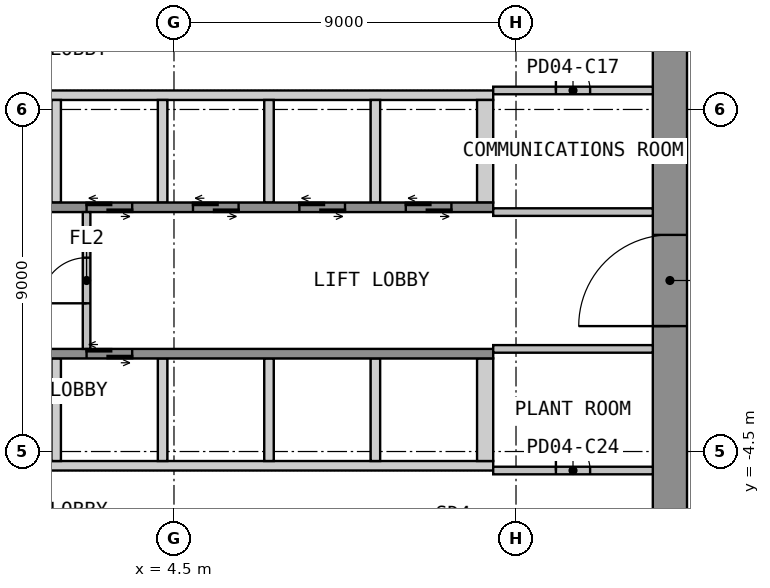
"""IFC4 building model, lengths in metres.
Left out: names, types, materials, properties, quantities, classifications, styles, units other than length and angle.
Written with IfcOpenShell. Run it as: python <this file> out.ifc"""

import sys

from ifc_helpers import new_model, si_unit, direction, frame, frame_2d, origin, place, context, subcontext, project, spatial, polyline, rectangle, outline, extrude, element, fill, save


model = new_model("IFC4")
c1 = context("Model", 3, precision=1e-05, world=origin(), true_north=direction((0.0, 1.0)))
c2 = subcontext(c1, "Body", "Model", "MODEL_VIEW")
j1 = project(units=[si_unit("LENGTHUNIT", "METRE"), si_unit("PLANEANGLEUNIT", "RADIAN")], contexts=[c1])
p1 = place(None, origin())
s1 = spatial("IfcSite", under=j1, at=p1, CompositionType="ELEMENT")
p2 = place(p1, origin())
s2 = spatial("IfcBuilding", under=s1, at=p2, CompositionType="ELEMENT")
p3 = place(p2, frame((0.0, 0.0, 20.4)))
s3 = spatial("IfcBuildingStorey", under=s2, at=p3, CompositionType="ELEMENT", Elevation=20.4)
p4 = place(p3, frame((17.55, -12.6, 0.0), z_axis=(0.0, 0.0, 1.0), x_axis=(0.0, 1.0, 0.0)))
e1 = element("IfcWall", 1, at=p4, inside=s3, PredefinedType="SHEAR", context=c2, shape_type="SweptSolid", body=[
    extrude(rectangle(XDim=25.2, YDim=0.9, at=frame_2d((12.6, 0.0))), origin(), (0.0, 0.0, 1.0), 4.4),
])
p5 = place(p4, frame((11.4, 0.0, 0.0)))
e2 = element("IfcOpeningElement", 2, at=p5, cuts=e1, PredefinedType="OPENING", context=c2, shape_type="SweptSolid", body=[
    extrude(rectangle(XDim=2.4, YDim=2.1, at=frame_2d((1.2, 1.05))), frame((0.0, 0.46, 0.0), z_axis=(0.0, -1.0, 0.0), x_axis=(1.0, 0.0, 0.0)), (0.0, 0.0, 1.0), 0.92),
])
p6 = place(p3, origin())
e3 = element("IfcWall", 3, at=p6, inside=s3, PredefinedType="SHEAR", context=c2, shape_type="SweptSolid", body=[
    extrude(outline(polyline([(-12.9, 4.75), (12.9, 4.75), (12.9, 5.0), (-12.9, 5.0), (-12.9, 4.75)])), origin(), (0.0, 0.0, 1.0), 4.4),
])
p7 = place(p3, origin())
e4 = element("IfcWall", 4, at=p7, inside=s3, PredefinedType="SHEAR", context=c2, shape_type="SweptSolid", body=[
    extrude(outline(polyline([(1.275, 2.05), (1.525, 2.05), (1.525, 4.75), (1.275, 4.75), (1.275, 2.05)])), origin(), (0.0, 0.0, 1.0), 4.4),
])
p8 = place(p3, origin())
e5 = element("IfcWall", 5, at=p8, inside=s3, PredefinedType="SHEAR", context=c2, shape_type="SweptSolid", body=[
    extrude(outline(polyline([(4.075, 2.05), (4.325, 2.05), (4.325, 4.75), (4.075, 4.75), (4.075, 2.05)])), origin(), (0.0, 0.0, 1.0), 4.4),
])
p9 = place(p3, origin())
e6 = element("IfcWall", 6, at=p9, inside=s3, PredefinedType="SHEAR", context=c2, shape_type="SweptSolid", body=[
    extrude(outline(polyline([(6.875, 2.05), (7.125, 2.05), (7.125, 4.75), (6.875, 4.75), (6.875, 2.05)])), origin(), (0.0, 0.0, 1.0), 4.4),
])
p10 = place(p3, origin())
e7 = element("IfcWall", 7, at=p10, inside=s3, PredefinedType="SHEAR", context=c2, shape_type="SweptSolid", body=[
    extrude(outline(polyline([(9.675, 2.05), (9.925, 2.05), (9.925, 4.75), (9.675, 4.75), (9.675, 2.05)])), origin(), (0.0, 0.0, 1.0), 4.4),
])
p11 = place(p3, origin())
e8 = element("IfcWall", 8, at=p11, inside=s3, PredefinedType="SHEAR", context=c2, shape_type="SweptSolid", body=[
    extrude(outline(polyline([(12.475, 2.05), (12.9, 2.05), (12.9, 4.75), (12.475, 4.75), (12.475, 2.05)])), origin(), (0.0, 0.0, 1.0), 4.4),
])
p12 = place(p3, frame((-12.9, 1.925, 0.0), z_axis=(0.0, 0.0, 1.0), x_axis=(1.0, 0.0, 0.0)))
e9 = element("IfcWall", 9, at=p12, inside=s3, PredefinedType="SHEAR", context=c2, shape_type="SweptSolid", body=[
    extrude(rectangle(XDim=25.8, YDim=0.25, at=frame_2d((12.9, 0.0))), origin(), (0.0, 0.0, 1.0), 4.4),
])
p13 = place(p12, frame((9.5, 0.0, 0.0)))
e10 = element("IfcOpeningElement", 10, at=p13, cuts=e9, PredefinedType="OPENING", context=c2, shape_type="SweptSolid", body=[
    extrude(rectangle(XDim=1.2, YDim=2.1, at=frame_2d((0.6, 1.05))), frame((0.0, 0.135, 0.0), z_axis=(0.0, -1.0, 0.0), x_axis=(1.0, 0.0, 0.0)), (0.0, 0.0, 1.0), 0.27),
])
p14 = place(p12, frame((12.3, 0.0, 0.0)))
e11 = element("IfcOpeningElement", 11, at=p14, cuts=e9, PredefinedType="OPENING", context=c2, shape_type="SweptSolid", body=[
    extrude(rectangle(XDim=1.2, YDim=2.1, at=frame_2d((0.6, 1.05))), frame((0.0, 0.135, 0.0), z_axis=(0.0, -1.0, 0.0), x_axis=(1.0, 0.0, 0.0)), (0.0, 0.0, 1.0), 0.27),
])
p15 = place(p12, frame((15.1, 0.0, 0.0)))
e12 = element("IfcOpeningElement", 12, at=p15, cuts=e9, PredefinedType="OPENING", context=c2, shape_type="SweptSolid", body=[
    extrude(rectangle(XDim=1.2, YDim=2.1, at=frame_2d((0.6, 1.05))), frame((0.0, 0.135, 0.0), z_axis=(0.0, -1.0, 0.0), x_axis=(1.0, 0.0, 0.0)), (0.0, 0.0, 1.0), 0.27),
])
p16 = place(p12, frame((17.9, 0.0, 0.0)))
e13 = element("IfcOpeningElement", 13, at=p16, cuts=e9, PredefinedType="OPENING", context=c2, shape_type="SweptSolid", body=[
    extrude(rectangle(XDim=1.2, YDim=2.1, at=frame_2d((0.6, 1.05))), frame((0.0, 0.135, 0.0), z_axis=(0.0, -1.0, 0.0), x_axis=(1.0, 0.0, 0.0)), (0.0, 0.0, 1.0), 0.27),
])
p17 = place(p12, frame((20.7, 0.0, 0.0)))
e14 = element("IfcOpeningElement", 14, at=p17, cuts=e9, PredefinedType="OPENING", context=c2, shape_type="SweptSolid", body=[
    extrude(rectangle(XDim=1.2, YDim=2.1, at=frame_2d((0.6, 1.05))), frame((0.0, 0.135, 0.0), z_axis=(0.0, -1.0, 0.0), x_axis=(1.0, 0.0, 0.0)), (0.0, 0.0, 1.0), 0.27),
])
p18 = place(p12, frame((23.5, 0.0, 0.0)))
e15 = element("IfcOpeningElement", 15, at=p18, cuts=e9, PredefinedType="OPENING", context=c2, shape_type="SweptSolid", body=[
    extrude(rectangle(XDim=1.2, YDim=2.1, at=frame_2d((0.6, 1.05))), frame((0.0, 0.135, 0.0), z_axis=(0.0, -1.0, 0.0), x_axis=(1.0, 0.0, 0.0)), (0.0, 0.0, 1.0), 0.27),
])
p19 = place(p3, origin())
e16 = element("IfcWall", 16, at=p19, inside=s3, PredefinedType="SHEAR", context=c2, shape_type="SweptSolid", body=[
    extrude(outline(polyline([(-12.9, -5.0), (12.9, -5.0), (12.9, -4.75), (-12.9, -4.75), (-12.9, -5.0)])), origin(), (0.0, 0.0, 1.0), 4.4),
])
p20 = place(p3, origin())
e17 = element("IfcWall", 17, at=p20, inside=s3, PredefinedType="SHEAR", context=c2, shape_type="SweptSolid", body=[
    extrude(outline(polyline([(1.275, -4.75), (1.525, -4.75), (1.525, -2.05), (1.275, -2.05), (1.275, -4.75)])), origin(), (0.0, 0.0, 1.0), 4.4),
])
p21 = place(p3, origin())
e18 = element("IfcWall", 18, at=p21, inside=s3, PredefinedType="SHEAR", context=c2, shape_type="SweptSolid", body=[
    extrude(outline(polyline([(4.075, -4.75), (4.325, -4.75), (4.325, -2.05), (4.075, -2.05), (4.075, -4.75)])), origin(), (0.0, 0.0, 1.0), 4.4),
])
p22 = place(p3, origin())
e19 = element("IfcWall", 19, at=p22, inside=s3, PredefinedType="SHEAR", context=c2, shape_type="SweptSolid", body=[
    extrude(outline(polyline([(6.875, -4.75), (7.125, -4.75), (7.125, -2.05), (6.875, -2.05), (6.875, -4.75)])), origin(), (0.0, 0.0, 1.0), 4.4),
])
p23 = place(p3, origin())
e20 = element("IfcWall", 20, at=p23, inside=s3, PredefinedType="SHEAR", context=c2, shape_type="SweptSolid", body=[
    extrude(outline(polyline([(9.675, -4.75), (9.925, -4.75), (9.925, -2.05), (9.675, -2.05), (9.675, -4.75)])), origin(), (0.0, 0.0, 1.0), 4.4),
])
p24 = place(p3, origin())
e21 = element("IfcWall", 21, at=p24, inside=s3, PredefinedType="SHEAR", context=c2, shape_type="SweptSolid", body=[
    extrude(outline(polyline([(12.475, -4.75), (12.9, -4.75), (12.9, -2.05), (12.475, -2.05), (12.475, -4.75)])), origin(), (0.0, 0.0, 1.0), 4.4),
])
p25 = place(p3, frame((-12.9, -1.925, 0.0), z_axis=(0.0, 0.0, 1.0), x_axis=(1.0, 0.0, 0.0)))
e22 = element("IfcWall", 22, at=p25, inside=s3, PredefinedType="SHEAR", context=c2, shape_type="SweptSolid", body=[
    extrude(rectangle(XDim=25.8, YDim=0.25, at=frame_2d((12.9, 0.0))), origin(), (0.0, 0.0, 1.0), 4.4),
])
p26 = place(p25, frame((1.1, 0.0, 0.0)))
e23 = element("IfcOpeningElement", 23, at=p26, cuts=e22, PredefinedType="OPENING", context=c2, shape_type="SweptSolid", body=[
    extrude(rectangle(XDim=1.2, YDim=2.1, at=frame_2d((0.6, 1.05))), frame((0.0, 0.135, 0.0), z_axis=(0.0, -1.0, 0.0), x_axis=(1.0, 0.0, 0.0)), (0.0, 0.0, 1.0), 0.27),
])
p27 = place(p25, frame((3.9, 0.0, 0.0)))
e24 = element("IfcOpeningElement", 24, at=p27, cuts=e22, PredefinedType="OPENING", context=c2, shape_type="SweptSolid", body=[
    extrude(rectangle(XDim=1.2, YDim=2.1, at=frame_2d((0.6, 1.05))), frame((0.0, 0.135, 0.0), z_axis=(0.0, -1.0, 0.0), x_axis=(1.0, 0.0, 0.0)), (0.0, 0.0, 1.0), 0.27),
])
p28 = place(p25, frame((6.7, 0.0, 0.0)))
e25 = element("IfcOpeningElement", 25, at=p28, cuts=e22, PredefinedType="OPENING", context=c2, shape_type="SweptSolid", body=[
    extrude(rectangle(XDim=1.2, YDim=2.1, at=frame_2d((0.6, 1.05))), frame((0.0, 0.135, 0.0), z_axis=(0.0, -1.0, 0.0), x_axis=(1.0, 0.0, 0.0)), (0.0, 0.0, 1.0), 0.27),
])
p29 = place(p25, frame((9.5, 0.0, 0.0)))
e26 = element("IfcOpeningElement", 26, at=p29, cuts=e22, PredefinedType="OPENING", context=c2, shape_type="SweptSolid", body=[
    extrude(rectangle(XDim=1.2, YDim=2.1, at=frame_2d((0.6, 1.05))), frame((0.0, 0.135, 0.0), z_axis=(0.0, -1.0, 0.0), x_axis=(1.0, 0.0, 0.0)), (0.0, 0.0, 1.0), 0.27),
])
p30 = place(p25, frame((12.3, 0.0, 0.0)))
e27 = element("IfcOpeningElement", 27, at=p30, cuts=e22, PredefinedType="OPENING", context=c2, shape_type="SweptSolid", body=[
    extrude(rectangle(XDim=1.2, YDim=2.1, at=frame_2d((0.6, 1.05))), frame((0.0, 0.135, 0.0), z_axis=(0.0, -1.0, 0.0), x_axis=(1.0, 0.0, 0.0)), (0.0, 0.0, 1.0), 0.27),
])
p31 = place(p25, frame((15.1, 0.0, 0.0)))
e28 = element("IfcOpeningElement", 28, at=p31, cuts=e22, PredefinedType="OPENING", context=c2, shape_type="SweptSolid", body=[
    extrude(rectangle(XDim=1.2, YDim=2.1, at=frame_2d((0.6, 1.05))), frame((0.0, 0.135, 0.0), z_axis=(0.0, -1.0, 0.0), x_axis=(1.0, 0.0, 0.0)), (0.0, 0.0, 1.0), 0.27),
])
p32 = place(p3, frame((2.2, -1.8, 0.0), z_axis=(0.0, 0.0, 1.0), x_axis=(0.0, 1.0, 0.0)))
e29 = element("IfcWall", 29, at=p32, inside=s3, PredefinedType="PARTITIONING", context=c2, shape_type="SweptSolid", body=[
    extrude(rectangle(XDim=3.6, YDim=0.2, at=frame_2d((1.8, 0.0))), origin(), (0.0, 0.0, 1.0), 4.4),
])
p33 = place(p32, frame((1.2, 0.0, 0.0)))
e30 = element("IfcOpeningElement", 30, at=p33, cuts=e29, PredefinedType="OPENING", context=c2, shape_type="SweptSolid", body=[
    extrude(rectangle(XDim=1.2, YDim=2.1, at=frame_2d((0.6, 1.05))), frame((0.0, 0.11, 0.0), z_axis=(0.0, -1.0, 0.0), x_axis=(1.0, 0.0, 0.0)), (0.0, 0.0, 1.0), 0.22),
])
p34 = place(p3, frame((12.9, 5.0, 0.0), z_axis=(0.0, 0.0, 1.0), x_axis=(1.0, 0.0, 0.0)))
e31 = element("IfcWall", 31, at=p34, inside=s3, PredefinedType="PARTITIONING", context=c2, shape_type="SweptSolid", body=[
    extrude(rectangle(XDim=4.2, YDim=0.2, at=frame_2d((2.1, 0.0))), origin(), (0.0, 0.0, 1.0), 4.4),
])
p35 = place(p34, frame((1.65, 0.0, 0.0)))
e32 = element("IfcOpeningElement", 32, at=p35, cuts=e31, PredefinedType="OPENING", context=c2, shape_type="SweptSolid", body=[
    extrude(rectangle(XDim=0.9, YDim=2.1, at=frame_2d((0.45, 1.05))), frame((0.0, 0.11, 0.0), z_axis=(0.0, -1.0, 0.0), x_axis=(1.0, 0.0, 0.0)), (0.0, 0.0, 1.0), 0.22),
])
p36 = place(p3, frame((12.9, 1.8, 0.0), z_axis=(0.0, 0.0, 1.0), x_axis=(1.0, 0.0, 0.0)))
e33 = element("IfcWall", 33, at=p36, inside=s3, PredefinedType="PARTITIONING", context=c2, shape_type="SweptSolid", body=[
    extrude(rectangle(XDim=4.2, YDim=0.2, at=frame_2d((2.1, 0.0))), origin(), (0.0, 0.0, 1.0), 4.4),
])
p37 = place(p3, frame((12.9, -5.0, 0.0), z_axis=(0.0, 0.0, 1.0), x_axis=(1.0, 0.0, 0.0)))
e34 = element("IfcWall", 34, at=p37, inside=s3, PredefinedType="PARTITIONING", context=c2, shape_type="SweptSolid", body=[
    extrude(rectangle(XDim=4.2, YDim=0.2, at=frame_2d((2.1, 0.0))), origin(), (0.0, 0.0, 1.0), 4.4),
])
p38 = place(p37, frame((1.65, 0.0, 0.0)))
e35 = element("IfcOpeningElement", 35, at=p38, cuts=e34, PredefinedType="OPENING", context=c2, shape_type="SweptSolid", body=[
    extrude(rectangle(XDim=0.9, YDim=2.1, at=frame_2d((0.45, 1.05))), frame((0.0, 0.11, 0.0), z_axis=(0.0, -1.0, 0.0), x_axis=(1.0, 0.0, 0.0)), (0.0, 0.0, 1.0), 0.22),
])
p39 = place(p3, frame((12.9, -1.8, 0.0), z_axis=(0.0, 0.0, 1.0), x_axis=(1.0, 0.0, 0.0)))
e36 = element("IfcWall", 36, at=p39, inside=s3, PredefinedType="PARTITIONING", context=c2, shape_type="SweptSolid", body=[
    extrude(rectangle(XDim=4.2, YDim=0.2, at=frame_2d((2.1, 0.0))), origin(), (0.0, 0.0, 1.0), 4.4),
])
p40 = place(p5, origin())
e37 = element("IfcDoor", 37, at=p40, inside=s3, OperationType="DOUBLE_DOOR_DOUBLE_SWING", PredefinedType="DOOR", context=c2, shape_type="SweptSolid", body=[
    extrude(rectangle(XDim=2.4, YDim=2.1, at=frame_2d((1.2, 1.05))), frame((0.0, 0.025, 0.0), z_axis=(0.0, -1.0, 0.0), x_axis=(1.0, 0.0, 0.0)), (0.0, 0.0, 1.0), 0.05),
])
fill(e2, e37)
p41 = place(p15, origin())
e38 = element("IfcDoor", 38, at=p41, inside=s3, OperationType="DOUBLE_DOOR_SLIDING", PredefinedType="DOOR", context=c2, shape_type="SweptSolid", body=[
    extrude(rectangle(XDim=1.2, YDim=2.1, at=frame_2d((0.6, 1.05))), frame((0.0, 0.025, 0.0), z_axis=(0.0, -1.0, 0.0), x_axis=(1.0, 0.0, 0.0)), (0.0, 0.0, 1.0), 0.05),
])
fill(e12, e38)
p42 = place(p16, origin())
e39 = element("IfcDoor", 39, at=p42, inside=s3, OperationType="DOUBLE_DOOR_SLIDING", PredefinedType="DOOR", context=c2, shape_type="SweptSolid", body=[
    extrude(rectangle(XDim=1.2, YDim=2.1, at=frame_2d((0.6, 1.05))), frame((0.0, 0.025, 0.0), z_axis=(0.0, -1.0, 0.0), x_axis=(1.0, 0.0, 0.0)), (0.0, 0.0, 1.0), 0.05),
])
fill(e13, e39)
p43 = place(p17, origin())
e40 = element("IfcDoor", 40, at=p43, inside=s3, OperationType="DOUBLE_DOOR_SLIDING", PredefinedType="DOOR", context=c2, shape_type="SweptSolid", body=[
    extrude(rectangle(XDim=1.2, YDim=2.1, at=frame_2d((0.6, 1.05))), frame((0.0, 0.025, 0.0), z_axis=(0.0, -1.0, 0.0), x_axis=(1.0, 0.0, 0.0)), (0.0, 0.0, 1.0), 0.05),
])
fill(e14, e40)
p44 = place(p18, origin())
e41 = element("IfcDoor", 41, at=p44, inside=s3, OperationType="DOUBLE_DOOR_SLIDING", PredefinedType="DOOR", context=c2, shape_type="SweptSolid", body=[
    extrude(rectangle(XDim=1.2, YDim=2.1, at=frame_2d((0.6, 1.05))), frame((0.0, 0.025, 0.0), z_axis=(0.0, -1.0, 0.0), x_axis=(1.0, 0.0, 0.0)), (0.0, 0.0, 1.0), 0.05),
])
fill(e15, e41)
p45 = place(p31, origin())
e42 = element("IfcDoor", 42, at=p45, inside=s3, OperationType="DOUBLE_DOOR_SLIDING", PredefinedType="DOOR", context=c2, shape_type="SweptSolid", body=[
    extrude(rectangle(XDim=1.2, YDim=2.1, at=frame_2d((0.6, 1.05))), frame((0.0, 0.025, 0.0), z_axis=(0.0, -1.0, 0.0), x_axis=(1.0, 0.0, 0.0)), (0.0, 0.0, 1.0), 0.05),
])
fill(e28, e42)
p46 = place(p33, origin())
e43 = element("IfcDoor", 43, at=p46, inside=s3, OperationType="SINGLE_SWING_LEFT", PredefinedType="DOOR", context=c2, shape_type="SweptSolid", body=[
    extrude(rectangle(XDim=1.2, YDim=2.1, at=frame_2d((0.6, 1.05))), frame((0.0, 0.025, 0.0), z_axis=(0.0, -1.0, 0.0), x_axis=(1.0, 0.0, 0.0)), (0.0, 0.0, 1.0), 0.05),
])
fill(e30, e43)
p47 = place(p35, origin())
e44 = element("IfcDoor", 44, at=p47, inside=s3, OperationType="SINGLE_SWING_LEFT", PredefinedType="DOOR", context=c2, shape_type="SweptSolid", body=[
    extrude(rectangle(XDim=0.9, YDim=2.1, at=frame_2d((0.45, 1.05))), frame((0.0, 0.025, 0.0), z_axis=(0.0, -1.0, 0.0), x_axis=(1.0, 0.0, 0.0)), (0.0, 0.0, 1.0), 0.05),
])
fill(e32, e44)
p48 = place(p38, origin())
e45 = element("IfcDoor", 45, at=p48, inside=s3, OperationType="SINGLE_SWING_LEFT", PredefinedType="DOOR", context=c2, shape_type="SweptSolid", body=[
    extrude(rectangle(XDim=0.9, YDim=2.1, at=frame_2d((0.45, 1.05))), frame((0.0, 0.025, 0.0), z_axis=(0.0, -1.0, 0.0), x_axis=(1.0, 0.0, 0.0)), (0.0, 0.0, 1.0), 0.05),
])
fill(e35, e45)
save(model, sys.argv[1])
